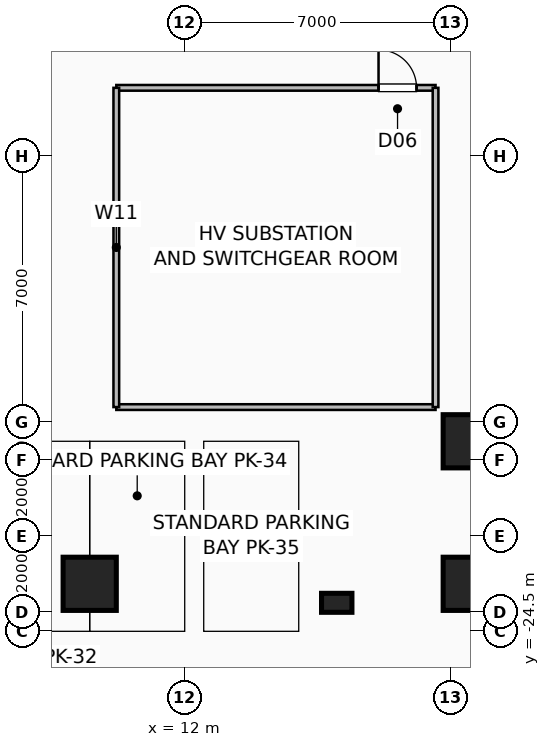
"""IFC4 building model, lengths in metres.
Left out: names, types, materials, properties, quantities, classifications, styles, units other than length and angle.
Written with IfcOpenShell. Run it as: python <this file> out.ifc"""

import sys

from ifc_helpers import new_model, si_unit, direction, frame, frame_2d, origin, origin_2d, place, context, subcontext, project, spatial, rectangle, extrude, element, fill, save


model = new_model("IFC4")
c1 = context("Model", 3, precision=1e-05, world=origin(), true_north=direction((0.0, 1.0)))
c2 = subcontext(c1, "Body", "Model", "MODEL_VIEW")
j1 = project(units=[si_unit("LENGTHUNIT", "METRE"), si_unit("PLANEANGLEUNIT", "RADIAN")], contexts=[c1])
p1 = place(None, origin())
s1 = spatial("IfcSite", under=j1, at=p1, CompositionType="ELEMENT")
p2 = place(p1, origin())
s2 = spatial("IfcBuilding", under=s1, at=p2, CompositionType="ELEMENT")
p3 = place(p2, frame((0.0, 0.0, -5.4)))
s3 = spatial("IfcBuildingStorey", under=s2, at=p3, CompositionType="ELEMENT", Elevation=-5.4)
for number, where, z_axis, x_axis in (
    (1, (9.5, -23.25, 0.0), (0.0, 0.0, 1.0), (1.0, 0.0, 0.0)),
    (2, (19.5, -23.25, 0.0), (0.0, 0.0, 1.0), (1.0, 0.0, 0.0)),
    (3, (19.5, -19.5, 0.0), (0.0, 0.0, 1.0), (1.0, 0.0, 0.0)),
):
    element("IfcColumn", number, at=place(p3, frame(where, z_axis=z_axis, x_axis=x_axis)), inside=s3, PredefinedType="COLUMN", context=c2, shape_type="SweptSolid", body=[
        extrude(rectangle(XDim=1.4, YDim=1.4, at=origin_2d()), origin(), (0.0, 0.0, 1.0), 5.4),
    ])
p4 = place(p3, frame((16.0, -23.75, 0.0), z_axis=(0.0, 0.0, 1.0), x_axis=(1.0, 0.0, 0.0)))
e4 = element("IfcColumn", 4, at=p4, inside=s3, PredefinedType="PILASTER", context=c2, shape_type="SweptSolid", body=[
    extrude(rectangle(XDim=0.5, YDim=0.8, at=origin_2d()), origin(), (0.0, 0.0, 1.0), 5.4),
])
p5 = place(p3, frame((10.2, -18.6, 0.0), z_axis=(0.0, 0.0, 1.0), x_axis=(1.0, 0.0, 0.0)))
e5 = element("IfcWall", 5, at=p5, inside=s3, PredefinedType="PARTITIONING", context=c2, shape_type="SweptSolid", body=[
    extrude(rectangle(XDim=8.4, YDim=0.15, at=frame_2d((4.2, 0.0))), origin(), (0.0, 0.0, 1.0), 5.05),
])
p6 = place(p3, frame((10.2, -10.2, 0.0), z_axis=(0.0, 0.0, 1.0), x_axis=(1.0, 0.0, 0.0)))
e6 = element("IfcWall", 6, at=p6, inside=s3, PredefinedType="PARTITIONING", context=c2, shape_type="SweptSolid", body=[
    extrude(rectangle(XDim=8.4, YDim=0.15, at=frame_2d((4.2, 0.0))), origin(), (0.0, 0.0, 1.0), 5.05),
])
p7 = place(p6, frame((6.9, 0.0, 0.0)))
e7 = element("IfcOpeningElement", 7, at=p7, cuts=e6, PredefinedType="OPENING", context=c2, shape_type="SweptSolid", body=[
    extrude(rectangle(XDim=1.0, YDim=2.08, at=frame_2d((0.5, 1.04))), frame((0.0, 0.085, 0.0), z_axis=(0.0, -1.0, 0.0), x_axis=(1.0, 0.0, 0.0)), (0.0, 0.0, 1.0), 0.17),
])
for number, where, z_axis, x_axis in (
    (8, (10.2, -18.6, 0.0), (0.0, 0.0, 1.0), (0.0, 1.0, 0.0)),
    (9, (18.6, -18.6, 0.0), (0.0, 0.0, 1.0), (0.0, 1.0, 0.0)),
):
    element("IfcWall", number, at=place(p3, frame(where, z_axis=z_axis, x_axis=x_axis)), inside=s3, PredefinedType="PARTITIONING", context=c2, shape_type="SweptSolid", body=[
        extrude(rectangle(XDim=8.4, YDim=0.15, at=frame_2d((4.2, 0.0))), origin(), (0.0, 0.0, 1.0), 5.05),
    ])
p8 = place(p7, origin())
e10 = element("IfcDoor", 10, at=p8, inside=s3, OperationType="SINGLE_SWING_LEFT", PredefinedType="DOOR", context=c2, shape_type="SweptSolid", body=[
    extrude(rectangle(XDim=1.0, YDim=2.08, at=frame_2d((0.5, 1.04))), frame((0.0, 0.025, 0.0), z_axis=(0.0, -1.0, 0.0), x_axis=(1.0, 0.0, 0.0)), (0.0, 0.0, 1.0), 0.05),
])
fill(e7, e10)
save(model, sys.argv[1])
